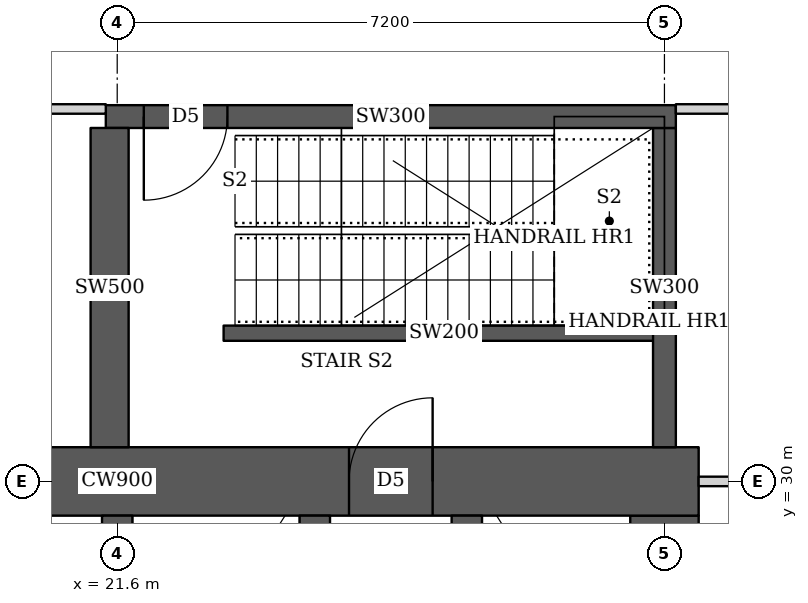
"""IFC4 building model, lengths in metres.
Left out: names, types, materials, properties, quantities, classifications, styles, units other than length and angle.
Written with IfcOpenShell. Run it as: python <this file> out.ifc"""

import sys

from ifc_helpers import new_model, si_unit, direction, frame, frame_2d, origin, place, context, subcontext, project, spatial, rectangle, extrude, element, fill, save


model = new_model("IFC4")
c1 = context("Model", 3, precision=1e-05, world=origin(), true_north=direction((0.0, 1.0)))
c2 = subcontext(c1, "Body", "Model", "MODEL_VIEW")
j1 = project(units=[si_unit("LENGTHUNIT", "METRE"), si_unit("PLANEANGLEUNIT", "RADIAN")], contexts=[c1])
p1 = place(None, origin())
s1 = spatial("IfcSite", under=j1, at=p1, CompositionType="ELEMENT")
p2 = place(p1, origin())
s2 = spatial("IfcBuilding", under=s1, at=p2, CompositionType="ELEMENT")
p3 = place(p2, frame((0.0, 0.0, 130.4)))
s3 = spatial("IfcBuildingStorey", under=s2, at=p3, CompositionType="ELEMENT", Elevation=130.4)
p4 = place(p3, frame((13.95, 30.0, 0.0), z_axis=(0.0, 0.0, 1.0), x_axis=(1.0, 0.0, 0.0)))
e1 = element("IfcWall", 1, at=p4, inside=s3, PredefinedType="SHEAR", context=c2, shape_type="SweptSolid", body=[
    extrude(rectangle(XDim=15.3, YDim=0.9, at=frame_2d((7.65, 0.0))), origin(), (0.0, 0.0, 1.0), 5.4),
])
p5 = place(p4, frame((4.45, 0.0, 0.0)))
e2 = element("IfcOpeningElement", 2, at=p5, cuts=e1, PredefinedType="OPENING", context=c2, shape_type="SweptSolid", body=[
    extrude(rectangle(XDim=1.8, YDim=2.1, at=frame_2d((0.9, 1.05))), frame((0.0, 0.46, 0.0), z_axis=(0.0, -1.0, 0.0), x_axis=(1.0, 0.0, 0.0)), (0.0, 0.0, 1.0), 0.92),
])
p6 = place(p4, frame((10.7, 0.0, 0.0)))
e3 = element("IfcOpeningElement", 3, at=p6, cuts=e1, PredefinedType="OPENING", context=c2, shape_type="SweptSolid", body=[
    extrude(rectangle(XDim=1.1, YDim=2.1, at=frame_2d((0.55, 1.05))), frame((0.0, 0.46, 0.0), z_axis=(0.0, -1.0, 0.0), x_axis=(1.0, 0.0, 0.0)), (0.0, 0.0, 1.0), 0.92),
])
p7 = place(p3, frame((28.8, 15.45, 0.0), z_axis=(0.0, 0.0, 1.0), x_axis=(0.0, 1.0, 0.0)))
e4 = element("IfcWall", 4, at=p7, inside=s3, PredefinedType="SHEAR", context=c2, shape_type="SweptSolid", body=[
    extrude(rectangle(XDim=14.1, YDim=0.9, at=frame_2d((7.05, 0.0))), origin(), (0.0, 0.0, 1.0), 5.4),
])
p8 = place(p3, frame((21.6, 15.45, 0.0), z_axis=(0.0, 0.0, 1.0), x_axis=(0.0, 1.0, 0.0)))
e5 = element("IfcWall", 5, at=p8, inside=s3, PredefinedType="SHEAR", context=c2, shape_type="SweptSolid", body=[
    extrude(rectangle(XDim=14.1, YDim=0.4, at=frame_2d((7.05, 0.0))), origin(), (0.0, 0.0, 1.0), 5.4),
])
p9 = place(p8, frame((0.875, 0.0, 0.0)))
e6 = element("IfcOpeningElement", 6, at=p9, cuts=e5, PredefinedType="OPENING", context=c2, shape_type="SweptSolid", body=[
    extrude(rectangle(XDim=1.1, YDim=2.1, at=frame_2d((0.55, 1.05))), frame((0.0, 0.21, 0.0), z_axis=(0.0, -1.0, 0.0), x_axis=(1.0, 0.0, 0.0)), (0.0, 0.0, 1.0), 0.42),
])
p10 = place(p8, frame((4.625, 0.0, 0.0)))
e7 = element("IfcOpeningElement", 7, at=p10, cuts=e5, PredefinedType="OPENING", context=c2, shape_type="SweptSolid", body=[
    extrude(rectangle(XDim=1.1, YDim=2.1, at=frame_2d((0.55, 1.05))), frame((0.0, 0.21, 0.0), z_axis=(0.0, -1.0, 0.0), x_axis=(1.0, 0.0, 0.0)), (0.0, 0.0, 1.0), 0.42),
])
p11 = place(p8, frame((8.375, 0.0, 0.0)))
e8 = element("IfcOpeningElement", 8, at=p11, cuts=e5, PredefinedType="OPENING", context=c2, shape_type="SweptSolid", body=[
    extrude(rectangle(XDim=1.1, YDim=2.1, at=frame_2d((0.55, 1.05))), frame((0.0, 0.21, 0.0), z_axis=(0.0, -1.0, 0.0), x_axis=(1.0, 0.0, 0.0)), (0.0, 0.0, 1.0), 0.42),
])
p12 = place(p8, frame((12.125, 0.0, 0.0)))
e9 = element("IfcOpeningElement", 9, at=p12, cuts=e5, PredefinedType="OPENING", context=c2, shape_type="SweptSolid", body=[
    extrude(rectangle(XDim=1.1, YDim=2.1, at=frame_2d((0.55, 1.05))), frame((0.0, 0.21, 0.0), z_axis=(0.0, -1.0, 0.0), x_axis=(1.0, 0.0, 0.0)), (0.0, 0.0, 1.0), 0.42),
])
p13 = place(p3, frame((24.2, 15.45, 0.0), z_axis=(0.0, 0.0, 1.0), x_axis=(0.0, 1.0, 0.0)))
e10 = element("IfcWall", 10, at=p13, inside=s3, PredefinedType="SHEAR", context=c2, shape_type="SweptSolid", body=[
    extrude(rectangle(XDim=14.1, YDim=0.4, at=frame_2d((7.05, 0.0))), origin(), (0.0, 0.0, 1.0), 5.4),
])
p14 = place(p3, frame((26.2, 26.45, 0.0), z_axis=(0.0, 0.0, 1.0), x_axis=(0.0, 1.0, 0.0)))
e11 = element("IfcWall", 11, at=p14, inside=s3, PredefinedType="SHEAR", context=c2, shape_type="SweptSolid", body=[
    extrude(rectangle(XDim=3.1, YDim=0.4, at=frame_2d((1.55, 0.0))), origin(), (0.0, 0.0, 1.0), 5.4),
])
p15 = place(p14, frame((1.075, 0.0, 0.0)))
e12 = element("IfcOpeningElement", 12, at=p15, cuts=e11, PredefinedType="OPENING", context=c2, shape_type="SweptSolid", body=[
    extrude(rectangle(XDim=1.2, YDim=2.1, at=frame_2d((0.6, 1.05))), frame((0.0, 0.21, 0.0), z_axis=(0.0, -1.0, 0.0), x_axis=(1.0, 0.0, 0.0)), (0.0, 0.0, 1.0), 0.42),
])
p16 = place(p3, frame((21.45, 34.8, 0.0), z_axis=(0.0, 0.0, 1.0), x_axis=(1.0, 0.0, 0.0)))
e13 = element("IfcWall", 13, at=p16, inside=s3, PredefinedType="SHEAR", context=c2, shape_type="SweptSolid", body=[
    extrude(rectangle(XDim=7.5, YDim=0.3, at=frame_2d((3.75, 0.0))), origin(), (0.0, 0.0, 1.0), 5.4),
])
p17 = place(p16, frame((0.5, 0.0, 0.0)))
e14 = element("IfcOpeningElement", 14, at=p17, cuts=e13, PredefinedType="OPENING", context=c2, shape_type="SweptSolid", body=[
    extrude(rectangle(XDim=1.1, YDim=2.1, at=frame_2d((0.55, 1.05))), frame((0.0, 0.16, 0.0), z_axis=(0.0, -1.0, 0.0), x_axis=(1.0, 0.0, 0.0)), (0.0, 0.0, 1.0), 0.32),
])
p18 = place(p3, frame((21.5, 30.45, 0.0), z_axis=(0.0, 0.0, 1.0), x_axis=(0.0, 1.0, 0.0)))
e15 = element("IfcWall", 15, at=p18, inside=s3, PredefinedType="SHEAR", context=c2, shape_type="SweptSolid", body=[
    extrude(rectangle(XDim=4.2, YDim=0.5, at=frame_2d((2.1, 0.0))), origin(), (0.0, 0.0, 1.0), 5.4),
])
p19 = place(p3, frame((28.8, 30.45, 0.0), z_axis=(0.0, 0.0, 1.0), x_axis=(0.0, 1.0, 0.0)))
e16 = element("IfcWall", 16, at=p19, inside=s3, PredefinedType="SHEAR", context=c2, shape_type="SweptSolid", body=[
    extrude(rectangle(XDim=4.2, YDim=0.3, at=frame_2d((2.1, 0.0))), origin(), (0.0, 0.0, 1.0), 5.4),
])
p20 = place(p3, frame((10.163, 34.9, 0.0), z_axis=(0.0, 0.0, 1.0), x_axis=(1.0, 0.0, 0.0)))
e17 = element("IfcWall", 17, at=p20, inside=s3, PredefinedType="PARTITIONING", context=c2, shape_type="SweptSolid", body=[
    extrude(rectangle(XDim=11.287, YDim=0.125, at=frame_2d((5.644, 0.0))), origin(), (0.0, 0.0, 1.0), 3.15),
])
p21 = place(p20, frame((7.737, 0.0, 0.0)))
e18 = element("IfcOpeningElement", 18, at=p21, cuts=e17, PredefinedType="OPENING", context=c2, shape_type="SweptSolid", body=[
    extrude(rectangle(XDim=1.8, YDim=2.1, at=frame_2d((0.9, 1.05))), frame((0.0, 0.073, 0.0), z_axis=(0.0, -1.0, 0.0), x_axis=(1.0, 0.0, 0.0)), (0.0, 0.0, 1.0), 0.145),
])
p22 = place(p3, frame((28.95, 34.9, 0.0), z_axis=(0.0, 0.0, 1.0), x_axis=(1.0, 0.0, 0.0)))
e19 = element("IfcWall", 19, at=p22, inside=s3, PredefinedType="PARTITIONING", context=c2, shape_type="SweptSolid", body=[
    extrude(rectangle(XDim=4.588, YDim=0.125, at=frame_2d((2.294, 0.0))), origin(), (0.0, 0.0, 1.0), 3.15),
])
p23 = place(p3, frame((29.25, 30.0, 0.0), z_axis=(0.0, 0.0, 1.0), x_axis=(1.0, 0.0, 0.0)))
e20 = element("IfcWall", 20, at=p23, inside=s3, PredefinedType="PARTITIONING", context=c2, shape_type="SweptSolid", body=[
    extrude(rectangle(XDim=2.949, YDim=0.125, at=frame_2d((1.475, 0.0))), origin(), (0.0, 0.0, 1.0), 3.55),
])
p24 = place(p3, frame((23.0, 31.95, 0.0), z_axis=(0.0, 0.0, 1.0), x_axis=(1.0, 0.0, 0.0)))
e21 = element("IfcWall", 21, at=p24, inside=s3, PredefinedType="SHEAR", context=c2, shape_type="SweptSolid", body=[
    extrude(rectangle(XDim=5.8, YDim=0.2, at=frame_2d((2.9, 0.0))), origin(), (0.0, 0.0, 1.0), 5.4),
])
p25 = place(p6, origin())
e22 = element("IfcDoor", 22, at=p25, inside=s3, OperationType="SINGLE_SWING_RIGHT", PredefinedType="DOOR", context=c2, shape_type="SweptSolid", body=[
    extrude(rectangle(XDim=1.1, YDim=2.1, at=frame_2d((0.55, 1.05))), frame((0.0, 0.025, 0.0), z_axis=(0.0, -1.0, 0.0), x_axis=(1.0, 0.0, 0.0)), (0.0, 0.0, 1.0), 0.05),
])
fill(e3, e22)
p26 = place(p17, origin())
e23 = element("IfcDoor", 23, at=p26, inside=s3, OperationType="SINGLE_SWING_RIGHT", PredefinedType="DOOR", context=c2, shape_type="SweptSolid", body=[
    extrude(rectangle(XDim=1.1, YDim=2.1, at=frame_2d((0.55, 1.05))), frame((0.0, 0.025, 0.0), z_axis=(0.0, -1.0, 0.0), x_axis=(1.0, 0.0, 0.0)), (0.0, 0.0, 1.0), 0.05),
])
fill(e14, e23)
save(model, sys.argv[1])
